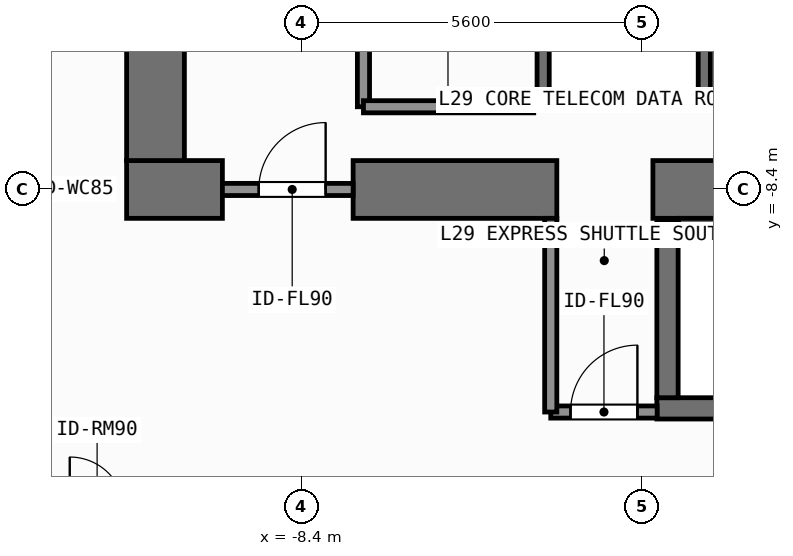
"""IFC4 building model, lengths in metres.
Left out: names, types, materials, properties, quantities, classifications, styles, units other than length and angle.
Written with IfcOpenShell. Run it as: python <this file> out.ifc"""

import sys

from ifc_helpers import new_model, si_unit, direction, frame, frame_2d, origin, place, context, subcontext, project, spatial, rectangle, extrude, element, fill, save


model = new_model("IFC4")
c1 = context("Model", 3, precision=1e-05, world=origin(), true_north=direction((0.0, 1.0)))
c2 = subcontext(c1, "Body", "Model", "MODEL_VIEW")
j1 = project(units=[si_unit("LENGTHUNIT", "METRE"), si_unit("PLANEANGLEUNIT", "RADIAN")], contexts=[c1])
p1 = place(None, origin())
s1 = spatial("IfcSite", under=j1, at=p1, CompositionType="ELEMENT")
p2 = place(p1, origin())
s2 = spatial("IfcBuilding", under=s1, at=p2, CompositionType="ELEMENT")
p3 = place(p2, frame((0.0, 0.0, 117.3)))
s3 = spatial("IfcBuildingStorey", under=s2, at=p3, CompositionType="ELEMENT", Elevation=117.3)
p4 = place(p3, frame((-11.275, -8.4, 0.0), z_axis=(0.0, 0.0, 1.0), x_axis=(1.0, 0.0, 0.0)))
e1 = element("IfcWall", 1, at=p4, inside=s3, PredefinedType="SHEAR", context=c2, shape_type="SweptSolid", body=[
    extrude(rectangle(XDim=1.575, YDim=0.95, at=frame_2d((0.788, 0.0))), origin(), (0.0, 0.0, 1.0), 3.9),
])
p5 = place(p3, frame((-7.55, -8.4, 0.0), z_axis=(0.0, 0.0, 1.0), x_axis=(1.0, 0.0, 0.0)))
e2 = element("IfcWall", 2, at=p5, inside=s3, PredefinedType="SHEAR", context=c2, shape_type="SweptSolid", body=[
    extrude(rectangle(XDim=3.35, YDim=0.95, at=frame_2d((1.675, 0.0))), origin(), (0.0, 0.0, 1.0), 3.9),
])
p6 = place(p3, frame((-2.62, -8.4, 0.0), z_axis=(0.0, 0.0, 1.0), x_axis=(1.0, 0.0, 0.0)))
e3 = element("IfcWall", 3, at=p6, inside=s3, PredefinedType="SHEAR", context=c2, shape_type="SweptSolid", body=[
    extrude(rectangle(XDim=7.27, YDim=0.95, at=frame_2d((3.635, 0.0))), origin(), (0.0, 0.0, 1.0), 3.9),
])
p7 = place(p3, frame((-10.8, -7.925, 0.0), z_axis=(0.0, 0.0, 1.0), x_axis=(0.0, 1.0, 0.0)))
e4 = element("IfcWall", 4, at=p7, inside=s3, PredefinedType="SHEAR", context=c2, shape_type="SweptSolid", body=[
    extrude(rectangle(XDim=15.85, YDim=0.95, at=frame_2d((7.925, 0.0))), origin(), (0.0, 0.0, 1.0), 3.9),
])
p8 = place(p3, frame((-2.555, -12.0, 0.0), z_axis=(0.0, 0.0, 1.0), x_axis=(1.0, 0.0, 0.0)))
e5 = element("IfcWall", 5, at=p8, inside=s3, PredefinedType="SHEAR", context=c2, shape_type="SweptSolid", body=[
    extrude(rectangle(XDim=7.31, YDim=0.35, at=frame_2d((3.655, 0.0))), origin(), (0.0, 0.0, 1.0), 3.9),
])
p9 = place(p3, frame((-2.2, -8.95, 0.0), z_axis=(0.0, 0.0, 1.0), x_axis=(1.0, 0.0, 0.0)))
e6 = element("IfcWall", 6, at=p9, inside=s3, PredefinedType="SHEAR", context=c2, shape_type="SweptSolid", body=[
    extrude(rectangle(XDim=6.6, YDim=0.15, at=frame_2d((3.3, 0.0))), origin(), (0.0, 0.0, 1.0), 3.9),
])
p10 = place(p3, frame((-2.38, -11.825, 0.0), z_axis=(0.0, 0.0, 1.0), x_axis=(0.0, 1.0, 0.0)))
e7 = element("IfcWall", 7, at=p10, inside=s3, PredefinedType="SHEAR", context=c2, shape_type="SweptSolid", body=[
    extrude(rectangle(XDim=2.925, YDim=0.35, at=frame_2d((1.462, 0.0))), origin(), (0.0, 0.0, 1.0), 3.9),
])
for number, where, z_axis, x_axis in (
    (8, (-4.425, -7.0, 0.0), (0.0, 0.0, 1.0), (0.0, 1.0, 0.0)),
    (9, (-1.775, -7.0, 0.0), (0.0, 0.0, 1.0), (0.0, 1.0, 0.0)),
):
    element("IfcWall", number, at=place(p3, frame(where, z_axis=z_axis, x_axis=x_axis)), inside=s3, PredefinedType="SHEAR", context=c2, shape_type="SweptSolid", body=[
        extrude(rectangle(XDim=2.8, YDim=0.2, at=frame_2d((1.4, 0.0))), origin(), (0.0, 0.0, 1.0), 3.68),
    ])
p11 = place(p3, frame((-4.325, -7.0, 0.0), z_axis=(0.0, 0.0, 1.0), x_axis=(1.0, 0.0, 0.0)))
e10 = element("IfcWall", 10, at=p11, inside=s3, PredefinedType="SHEAR", context=c2, shape_type="SweptSolid", body=[
    extrude(rectangle(XDim=2.45, YDim=0.2, at=frame_2d((1.225, 0.0))), origin(), (0.0, 0.0, 1.0), 3.68),
])
p12 = place(p3, frame((-9.7, -8.4, 0.0), z_axis=(0.0, 0.0, 1.0), x_axis=(1.0, 0.0, 0.0)))
e11 = element("IfcWall", 11, at=p12, inside=s3, PredefinedType="SOLIDWALL", context=c2, shape_type="SweptSolid", body=[
    extrude(rectangle(XDim=2.15, YDim=0.2, at=frame_2d((1.075, 0.0))), origin(), (0.0, 0.0, 1.0), 2.72),
])
p13 = place(p12, frame((0.598, 0.0, 0.0)))
e12 = element("IfcOpeningElement", 12, at=p13, cuts=e11, PredefinedType="OPENING", context=c2, shape_type="SweptSolid", body=[
    extrude(rectangle(XDim=1.1, YDim=2.15, at=frame_2d((0.55, 1.075))), frame((0.0, 0.11, 0.0), z_axis=(0.0, -1.0, 0.0), x_axis=(1.0, 0.0, 0.0)), (0.0, 0.0, 1.0), 0.22),
])
p14 = place(p3, frame((-4.3, -12.06, 0.0), z_axis=(0.0, 0.0, 1.0), x_axis=(1.0, 0.0, 0.0)))
e13 = element("IfcWall", 13, at=p14, inside=s3, PredefinedType="SOLIDWALL", context=c2, shape_type="SweptSolid", body=[
    extrude(rectangle(XDim=1.75, YDim=0.2, at=frame_2d((0.875, 0.0))), origin(), (0.0, 0.0, 1.0), 3.68),
])
p15 = place(p14, frame((0.325, 0.0, 0.0)))
e14 = element("IfcOpeningElement", 14, at=p15, cuts=e13, PredefinedType="OPENING", context=c2, shape_type="SweptSolid", body=[
    extrude(rectangle(XDim=1.1, YDim=2.15, at=frame_2d((0.55, 1.075))), frame((0.0, 0.11, 0.0), z_axis=(0.0, -1.0, 0.0), x_axis=(1.0, 0.0, 0.0)), (0.0, 0.0, 1.0), 0.22),
])
p16 = place(p3, frame((-7.38, -7.04, 0.0), z_axis=(0.0, 0.0, 1.0), x_axis=(0.0, 1.0, 0.0)))
e15 = element("IfcWall", 15, at=p16, inside=s3, PredefinedType="SOLIDWALL", context=c2, shape_type="SweptSolid", body=[
    extrude(rectangle(XDim=2.9, YDim=0.2, at=frame_2d((1.45, 0.0))), origin(), (0.0, 0.0, 1.0), 3.68),
])
p17 = place(p16, frame((0.99, 0.0, 0.0)))
e16 = element("IfcOpeningElement", 16, at=p17, cuts=e15, PredefinedType="OPENING", context=c2, shape_type="SweptSolid", body=[
    extrude(rectangle(XDim=0.92, YDim=2.1, at=frame_2d((0.46, 1.05))), frame((0.0, 0.11, 0.0), z_axis=(0.0, -1.0, 0.0), x_axis=(1.0, 0.0, 0.0)), (0.0, 0.0, 1.0), 0.22),
])
p18 = place(p3, frame((-4.3, -12.06, 0.0), z_axis=(0.0, 0.0, 1.0), x_axis=(0.0, 1.0, 0.0)))
e17 = element("IfcWall", 17, at=p18, inside=s3, PredefinedType="SOLIDWALL", context=c2, shape_type="SweptSolid", body=[
    extrude(rectangle(XDim=3.185, YDim=0.2, at=frame_2d((1.593, 0.0))), origin(), (0.0, 0.0, 1.0), 3.68),
])
p19 = place(p3, frame((-7.38, -7.04, 0.0), z_axis=(0.0, 0.0, 1.0), x_axis=(1.0, 0.0, 0.0)))
e18 = element("IfcWall", 18, at=p19, inside=s3, PredefinedType="SOLIDWALL", context=c2, shape_type="SweptSolid", body=[
    extrude(rectangle(XDim=2.8, YDim=0.2, at=frame_2d((1.4, 0.0))), origin(), (0.0, 0.0, 1.0), 3.68),
])
p20 = place(p13, origin())
e19 = element("IfcDoor", 19, at=p20, inside=s3, OperationType="SINGLE_SWING_RIGHT", PredefinedType="DOOR", context=c2, shape_type="SweptSolid", body=[
    extrude(rectangle(XDim=1.1, YDim=2.15, at=frame_2d((0.55, 1.075))), frame((0.0, 0.025, 0.0), z_axis=(0.0, -1.0, 0.0), x_axis=(1.0, 0.0, 0.0)), (0.0, 0.0, 1.0), 0.05),
])
fill(e12, e19)
p21 = place(p15, origin())
e20 = element("IfcDoor", 20, at=p21, inside=s3, OperationType="SINGLE_SWING_RIGHT", PredefinedType="DOOR", context=c2, shape_type="SweptSolid", body=[
    extrude(rectangle(XDim=1.1, YDim=2.15, at=frame_2d((0.55, 1.075))), frame((0.0, 0.025, 0.0), z_axis=(0.0, -1.0, 0.0), x_axis=(1.0, 0.0, 0.0)), (0.0, 0.0, 1.0), 0.05),
])
fill(e14, e20)
save(model, sys.argv[1])
